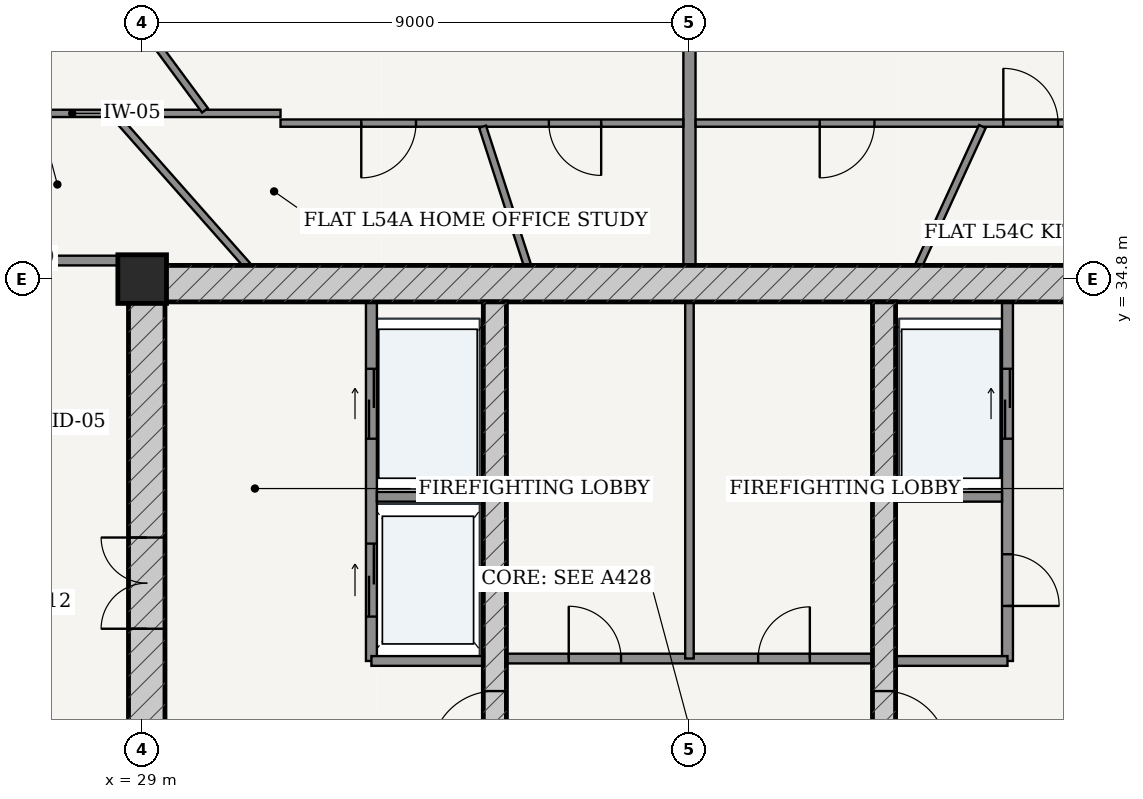
"""IFC4 building model, lengths in metres.
Left out: names, types, materials, properties, quantities, classifications, styles, units other than length and angle.
Written with IfcOpenShell. Run it as: python <this file> out.ifc"""

import sys

from ifc_helpers import new_model, si_unit, direction, frame, frame_2d, origin, origin_2d, place, context, subcontext, project, spatial, rectangle, extrude, source, transform, mapped, element, fill, save


model = new_model("IFC4")
c1 = context("Model", 3, precision=1e-05, world=origin(), true_north=direction((-0.2419218956, 0.970295726276)))
c2 = subcontext(c1, "Body", "Model", "MODEL_VIEW")
j1 = project(units=[si_unit("LENGTHUNIT", "METRE"), si_unit("PLANEANGLEUNIT", "RADIAN")], contexts=[c1])
p1 = place(None, origin())
s1 = spatial("IfcSite", under=j1, at=p1, CompositionType="ELEMENT")
p2 = place(p1, origin())
s2 = spatial("IfcBuilding", under=s1, at=p2, CompositionType="ELEMENT")
p3 = place(p2, frame((0.0, 0.0, 206.0)))
s3 = spatial("IfcBuildingStorey", under=s2, at=p3, CompositionType="ELEMENT", Elevation=206.0)
p4 = place(p3, frame((29.0, 34.8, 0.0), z_axis=(0.0, 0.0, 1.0), x_axis=(1.0, 0.0, 0.0)))
e1 = element("IfcColumn", 1, at=p4, inside=s3, PredefinedType="COLUMN", context=c2, shape_type="SweptSolid", body=[
    extrude(rectangle(XDim=0.8, YDim=0.8, at=origin_2d()), origin(), (0.0, 0.0, 1.0), 3.7),
])
p5 = place(p3, frame((28.775, 34.725, 0.0), z_axis=(0.0, 0.0, 1.0), x_axis=(1.0, 0.0, 0.0)))
e2 = element("IfcWall", 2, at=p5, inside=s3, PredefinedType="SHEAR", context=c2, shape_type="SweptSolid", body=[
    extrude(rectangle(XDim=18.45, YDim=0.6, at=frame_2d((9.225, 0.0))), origin(), (0.0, 0.0, 1.0), 3.435),
])
p6 = place(p3, frame((29.075, 19.175, 0.0), z_axis=(0.0, 0.0, 1.0), x_axis=(0.0, 1.0, 0.0)))
e3 = element("IfcWall", 3, at=p6, inside=s3, PredefinedType="SHEAR", context=c2, shape_type="SweptSolid", body=[
    extrude(rectangle(XDim=15.25, YDim=0.6, at=frame_2d((7.625, 0.0))), origin(), (0.0, 0.0, 1.0), 3.435),
])
p7 = place(p6, frame((9.875, 0.0, 0.0)))
e4 = element("IfcOpeningElement", 4, at=p7, cuts=e3, PredefinedType="OPENING", context=c2, shape_type="SweptSolid", body=[
    extrude(rectangle(XDim=1.5, YDim=2.2, at=frame_2d((0.75, 1.1))), frame((0.0, 0.31, 0.0), z_axis=(0.0, -1.0, 0.0), x_axis=(1.0, 0.0, 0.0)), (0.0, 0.0, 1.0), 0.62),
])
p8 = place(p3, frame((34.8, 19.175, 0.0), z_axis=(0.0, 0.0, 1.0), x_axis=(0.0, 1.0, 0.0)))
e5 = element("IfcWall", 5, at=p8, inside=s3, PredefinedType="SHEAR", context=c2, shape_type="SweptSolid", body=[
    extrude(rectangle(XDim=15.25, YDim=0.38, at=frame_2d((7.625, 0.0))), origin(), (0.0, 0.0, 1.0), 3.435),
])
p9 = place(p8, frame((7.8, 0.0, 0.0)))
e6 = element("IfcOpeningElement", 6, at=p9, cuts=e5, PredefinedType="OPENING", context=c2, shape_type="SweptSolid", body=[
    extrude(rectangle(XDim=1.05, YDim=2.15, at=frame_2d((0.525, 1.075))), frame((0.0, 0.2, 0.0), z_axis=(0.0, -1.0, 0.0), x_axis=(1.0, 0.0, 0.0)), (0.0, 0.0, 1.0), 0.4),
])
p10 = place(p3, frame((41.2, 19.175, 0.0), z_axis=(0.0, 0.0, 1.0), x_axis=(0.0, 1.0, 0.0)))
e7 = element("IfcWall", 7, at=p10, inside=s3, PredefinedType="SHEAR", context=c2, shape_type="SweptSolid", body=[
    extrude(rectangle(XDim=15.25, YDim=0.38, at=frame_2d((7.625, 0.0))), origin(), (0.0, 0.0, 1.0), 3.435),
])
p11 = place(p10, frame((7.8, 0.0, 0.0)))
e8 = element("IfcOpeningElement", 8, at=p11, cuts=e7, PredefinedType="OPENING", context=c2, shape_type="SweptSolid", body=[
    extrude(rectangle(XDim=1.05, YDim=2.15, at=frame_2d((0.525, 1.075))), frame((0.0, 0.2, 0.0), z_axis=(0.0, -1.0, 0.0), x_axis=(1.0, 0.0, 0.0)), (0.0, 0.0, 1.0), 0.4),
])
p12 = place(p3, frame((32.77, 28.52, 0.0), z_axis=(0.0, 0.0, 1.0), x_axis=(0.0, 1.0, 0.0)))
e9 = element("IfcWall", 9, at=p12, inside=s3, PredefinedType="PARTITIONING", context=c2, shape_type="SweptSolid", body=[
    extrude(rectangle(XDim=5.905, YDim=0.18, at=frame_2d((2.953, 0.0))), origin(), (0.0, 0.0, 1.0), 3.435),
])
p13 = place(p12, frame((3.655, 0.0, 0.0)))
e10 = element("IfcOpeningElement", 10, at=p13, cuts=e9, PredefinedType="OPENING", context=c2, shape_type="SweptSolid", body=[
    extrude(rectangle(XDim=1.15, YDim=2.2, at=frame_2d((0.575, 1.1))), frame((0.0, 0.1, 0.0), z_axis=(0.0, -1.0, 0.0), x_axis=(1.0, 0.0, 0.0)), (0.0, 0.0, 1.0), 0.2),
])
p14 = place(p12, frame((0.73, 0.0, 0.0)))
e11 = element("IfcOpeningElement", 11, at=p14, cuts=e9, PredefinedType="OPENING", context=c2, shape_type="SweptSolid", body=[
    extrude(rectangle(XDim=1.2, YDim=2.25, at=frame_2d((0.6, 1.125))), frame((0.0, 0.1, 0.0), z_axis=(0.0, -1.0, 0.0), x_axis=(1.0, 0.0, 0.0)), (0.0, 0.0, 1.0), 0.2),
])
p15 = place(p3, frame((32.86, 31.22, 0.0), z_axis=(0.0, 0.0, 1.0), x_axis=(1.0, 0.0, 0.0)))
e12 = element("IfcWall", 12, at=p15, inside=s3, PredefinedType="PARTITIONING", context=c2, shape_type="SweptSolid", body=[
    extrude(rectangle(XDim=1.75, YDim=0.16, at=frame_2d((0.875, 0.0))), origin(), (0.0, 0.0, 1.0), 3.435),
])
p16 = place(p3, frame((32.77, 28.52, 0.0), z_axis=(0.0, 0.0, 1.0), x_axis=(1.0, 0.0, 0.0)))
e13 = element("IfcWall", 13, at=p16, inside=s3, PredefinedType="PARTITIONING", context=c2, shape_type="SweptSolid", body=[
    extrude(rectangle(XDim=1.84, YDim=0.16, at=frame_2d((0.92, 0.0))), origin(), (0.0, 0.0, 1.0), 3.435),
])
p17 = place(p3, frame((43.23, 28.52, 0.0), z_axis=(0.0, 0.0, 1.0), x_axis=(0.0, 1.0, 0.0)))
e14 = element("IfcWall", 14, at=p17, inside=s3, PredefinedType="PARTITIONING", context=c2, shape_type="SweptSolid", body=[
    extrude(rectangle(XDim=5.905, YDim=0.18, at=frame_2d((2.953, 0.0))), origin(), (0.0, 0.0, 1.0), 3.435),
])
p18 = place(p17, frame((0.905, 0.0, 0.0)))
e15 = element("IfcOpeningElement", 15, at=p18, cuts=e14, PredefinedType="OPENING", context=c2, shape_type="SweptSolid", body=[
    extrude(rectangle(XDim=0.85, YDim=2.1, at=frame_2d((0.425, 1.05))), frame((0.0, 0.1, 0.0), z_axis=(0.0, -1.0, 0.0), x_axis=(1.0, 0.0, 0.0)), (0.0, 0.0, 1.0), 0.2),
])
p19 = place(p17, frame((3.655, 0.0, 0.0)))
e16 = element("IfcOpeningElement", 16, at=p19, cuts=e14, PredefinedType="OPENING", context=c2, shape_type="SweptSolid", body=[
    extrude(rectangle(XDim=1.15, YDim=2.2, at=frame_2d((0.575, 1.1))), frame((0.0, 0.1, 0.0), z_axis=(0.0, -1.0, 0.0), x_axis=(1.0, 0.0, 0.0)), (0.0, 0.0, 1.0), 0.2),
])
p20 = place(p3, frame((41.39, 31.22, 0.0), z_axis=(0.0, 0.0, 1.0), x_axis=(1.0, 0.0, 0.0)))
e17 = element("IfcWall", 17, at=p20, inside=s3, PredefinedType="PARTITIONING", context=c2, shape_type="SweptSolid", body=[
    extrude(rectangle(XDim=1.75, YDim=0.16, at=frame_2d((0.875, 0.0))), origin(), (0.0, 0.0, 1.0), 3.435),
])
p21 = place(p3, frame((41.39, 28.52, 0.0), z_axis=(0.0, 0.0, 1.0), x_axis=(1.0, 0.0, 0.0)))
e18 = element("IfcWall", 18, at=p21, inside=s3, PredefinedType="PARTITIONING", context=c2, shape_type="SweptSolid", body=[
    extrude(rectangle(XDim=1.84, YDim=0.16, at=frame_2d((0.92, 0.0))), origin(), (0.0, 0.0, 1.0), 3.435),
])
p22 = place(p3, frame((34.99, 28.56, 0.0), z_axis=(0.0, 0.0, 1.0), x_axis=(1.0, 0.0, 0.0)))
e19 = element("IfcWall", 19, at=p22, inside=s3, PredefinedType="PARTITIONING", context=c2, shape_type="SweptSolid", body=[
    extrude(rectangle(XDim=6.02, YDim=0.16, at=frame_2d((3.01, 0.0))), origin(), (0.0, 0.0, 1.0), 3.435),
])
p23 = place(p22, frame((1.025, 0.0, 0.0)))
e20 = element("IfcOpeningElement", 20, at=p23, cuts=e19, PredefinedType="OPENING", context=c2, shape_type="SweptSolid", body=[
    extrude(rectangle(XDim=0.86, YDim=2.1, at=frame_2d((0.43, 1.05))), frame((0.0, 0.09, 0.0), z_axis=(0.0, -1.0, 0.0), x_axis=(1.0, 0.0, 0.0)), (0.0, 0.0, 1.0), 0.18),
])
p24 = place(p22, frame((4.14, 0.0, 0.0)))
e21 = element("IfcOpeningElement", 21, at=p24, cuts=e19, PredefinedType="OPENING", context=c2, shape_type="SweptSolid", body=[
    extrude(rectangle(XDim=0.85, YDim=2.1, at=frame_2d((0.425, 1.05))), frame((0.0, 0.09, 0.0), z_axis=(0.0, -1.0, 0.0), x_axis=(1.0, 0.0, 0.0)), (0.0, 0.0, 1.0), 0.18),
])
p25 = place(p3, frame((38.0, 28.56, 0.0), z_axis=(0.0, 0.0, 1.0), x_axis=(0.0, 1.0, 0.0)))
e22 = element("IfcWall", 22, at=p25, inside=s3, PredefinedType="PARTITIONING", context=c2, shape_type="SweptSolid", body=[
    extrude(rectangle(XDim=5.865, YDim=0.14, at=frame_2d((2.933, 0.0))), origin(), (0.0, 0.0, 1.0), 3.435),
])
p26 = place(p3, frame((26.845, 35.105, 0.0), z_axis=(0.0, 0.0, 1.0), x_axis=(1.0, 0.0, 0.0)))
e23 = element("IfcWall", 23, at=p26, inside=s3, PredefinedType="PARTITIONING", context=c2, shape_type="SweptSolid", body=[
    extrude(rectangle(XDim=1.93, YDim=0.16, at=frame_2d((0.965, 0.0))), origin(), (0.0, 0.0, 1.0), 3.435),
])
p27 = place(p3, frame((38.0, 35.027, 0.0), z_axis=(0.0, 0.0, 1.0), x_axis=(0.0, 1.0, 0.0)))
e24 = element("IfcWall", 24, at=p27, inside=s3, PredefinedType="PARTITIONING", context=c2, shape_type="SweptSolid", body=[
    extrude(rectangle(XDim=11.413, YDim=0.2, at=frame_2d((5.707, 0.0))), origin(), (0.0, 0.0, 1.0), 2.52),
])
p28 = place(p3, frame((24.425, 37.525, 0.0), z_axis=(0.0, 0.0, 1.0), x_axis=(1.0, 0.0, 0.0)))
e25 = element("IfcWall", 25, at=p28, inside=s3, PredefinedType="PARTITIONING", context=c2, shape_type="SweptSolid", body=[
    extrude(rectangle(XDim=6.85, YDim=0.12, at=frame_2d((3.425, 0.0))), origin(), (0.0, 0.0, 1.0), 2.951),
])
p29 = place(p3, frame((31.275, 37.365, 0.0), z_axis=(0.0, 0.0, 1.0), x_axis=(1.0, 0.0, 0.0)))
e26 = element("IfcWall", 26, at=p29, inside=s3, PredefinedType="PARTITIONING", context=c2, shape_type="SweptSolid", body=[
    extrude(rectangle(XDim=6.623, YDim=0.12, at=frame_2d((3.312, 0.0))), origin(), (0.0, 0.0, 1.0), 2.951),
])
p30 = place(p29, frame((4.413, 0.0, 0.0)))
e27 = element("IfcOpeningElement", 27, at=p30, cuts=e26, PredefinedType="OPENING", context=c2, shape_type="SweptSolid", body=[
    extrude(rectangle(XDim=0.86, YDim=2.15, at=frame_2d((0.43, 1.075))), frame((0.0, 0.07, 0.0), z_axis=(0.0, -1.0, 0.0), x_axis=(1.0, 0.0, 0.0)), (0.0, 0.0, 1.0), 0.14),
])
p31 = place(p29, frame((1.328, 0.0, 0.0)))
e28 = element("IfcOpeningElement", 28, at=p31, cuts=e26, PredefinedType="OPENING", context=c2, shape_type="SweptSolid", body=[
    extrude(rectangle(XDim=0.9, YDim=2.15, at=frame_2d((0.45, 1.075))), frame((0.0, 0.07, 0.0), z_axis=(0.0, -1.0, 0.0), x_axis=(1.0, 0.0, 0.0)), (0.0, 0.0, 1.0), 0.14),
])
p32 = place(p3, frame((30.033, 37.575, 0.0), z_axis=(0.0, 0.0, 1.0), x_axis=(-0.59452500855, 0.804077119565, 0.0)))
e29 = element("IfcWall", 29, at=p32, inside=s3, PredefinedType="PARTITIONING", context=c2, shape_type="SweptSolid", body=[
    extrude(rectangle(XDim=6.867, YDim=0.12, at=frame_2d((3.434, 0.0))), origin(), (0.0, 0.0, 1.0), 2.951),
])
p33 = place(p32, frame((1.976, 0.0, 0.0)))
e30 = element("IfcOpeningElement", 30, at=p33, cuts=e29, PredefinedType="OPENING", context=c2, shape_type="SweptSolid", body=[
    extrude(rectangle(XDim=0.9, YDim=2.15, at=frame_2d((0.45, 1.075))), frame((0.0, 0.07, 0.0), z_axis=(0.0, -1.0, 0.0), x_axis=(1.0, 0.0, 0.0)), (0.0, 0.0, 1.0), 0.14),
])
p34 = place(p3, frame((35.336, 35.027, 0.0), z_axis=(0.0, 0.0, 1.0), x_axis=(-0.308083476138, 0.951359328398, 0.0)))
e31 = element("IfcWall", 31, at=p34, inside=s3, PredefinedType="PARTITIONING", context=c2, shape_type="SweptSolid", body=[
    extrude(rectangle(XDim=2.396, YDim=0.12, at=frame_2d((1.198, 0.0))), origin(), (0.0, 0.0, 1.0), 2.52),
])
p35 = place(p3, frame((30.726, 35.027, 0.0), z_axis=(0.0, 0.0, 1.0), x_axis=(-0.662398427862, 0.749151735475, 0.0)))
e32 = element("IfcWall", 32, at=p35, inside=s3, PredefinedType="PARTITIONING", context=c2, shape_type="SweptSolid", body=[
    extrude(rectangle(XDim=3.273, YDim=0.12, at=frame_2d((1.636, 0.0))), origin(), (0.0, 0.0, 1.0), 3.435),
])
p36 = place(p3, frame((38.102, 37.365, 0.0), z_axis=(0.0, 0.0, 1.0), x_axis=(1.0, 0.0, 0.0)))
e33 = element("IfcWall", 33, at=p36, inside=s3, PredefinedType="PARTITIONING", context=c2, shape_type="SweptSolid", body=[
    extrude(rectangle(XDim=6.623, YDim=0.12, at=frame_2d((3.312, 0.0))), origin(), (0.0, 0.0, 1.0), 2.951),
])
p37 = place(p36, frame((5.06, 0.0, 0.0)))
e34 = element("IfcOpeningElement", 34, at=p37, cuts=e33, PredefinedType="OPENING", context=c2, shape_type="SweptSolid", body=[
    extrude(rectangle(XDim=0.9, YDim=2.15, at=frame_2d((0.45, 1.075))), frame((0.0, 0.07, 0.0), z_axis=(0.0, -1.0, 0.0), x_axis=(1.0, 0.0, 0.0)), (0.0, 0.0, 1.0), 0.14),
])
p38 = place(p36, frame((2.04, 0.0, 0.0)))
e35 = element("IfcOpeningElement", 35, at=p38, cuts=e33, PredefinedType="OPENING", context=c2, shape_type="SweptSolid", body=[
    extrude(rectangle(XDim=0.9, YDim=2.15, at=frame_2d((0.45, 1.075))), frame((0.0, 0.07, 0.0), z_axis=(0.0, -1.0, 0.0), x_axis=(1.0, 0.0, 0.0)), (0.0, 0.0, 1.0), 0.14),
])
p39 = place(p3, frame((41.771, 35.027, 0.0), z_axis=(0.0, 0.0, 1.0), x_axis=(0.416688202143, 0.909049471808, 0.0)))
e36 = element("IfcWall", 36, at=p39, inside=s3, PredefinedType="PARTITIONING", context=c2, shape_type="SweptSolid", body=[
    extrude(rectangle(XDim=2.51, YDim=0.12, at=frame_2d((1.255, 0.0))), origin(), (0.0, 0.0, 1.0), 3.435),
])
m1 = source(origin(), c2, "Body", "SweptSolid", [
    extrude(rectangle(XDim=1.5, YDim=2.2, at=frame_2d((0.75, 1.1))), frame((0.0, 0.025, 0.0), z_axis=(0.0, -1.0, 0.0), x_axis=(1.0, 0.0, 0.0)), (0.0, 0.0, 1.0), 0.05),
])
p40 = place(p7, origin())
e37 = element("IfcDoor", 37, at=p40, inside=s3, OperationType="DOUBLE_DOOR_SINGLE_SWING", PredefinedType="DOOR", context=c2, shape_type="MappedRepresentation", body=[
    mapped(m1, transform((0.0, 0.0, 0.0), scale=1.0)),
])
fill(e4, e37)
m2 = source(origin(), c2, "Body", "SweptSolid", [
    extrude(rectangle(XDim=1.05, YDim=2.15, at=frame_2d((0.525, 1.075))), frame((0.0, 0.025, 0.0), z_axis=(0.0, -1.0, 0.0), x_axis=(1.0, 0.0, 0.0)), (0.0, 0.0, 1.0), 0.05),
])
p41 = place(p9, origin())
e38 = element("IfcDoor", 38, at=p41, inside=s3, OperationType="SINGLE_SWING_LEFT", PredefinedType="DOOR", context=c2, shape_type="MappedRepresentation", body=[
    mapped(m2, transform((0.0, 0.0, 0.0), scale=1.0)),
])
fill(e6, e38)
p42 = place(p11, frame((1.05, 0.0, 0.0), z_axis=(0.0, 0.0, 1.0), x_axis=(-1.0, 0.0, 0.0)))
e39 = element("IfcDoor", 39, at=p42, inside=s3, OperationType="SINGLE_SWING_RIGHT", PredefinedType="DOOR", context=c2, shape_type="MappedRepresentation", body=[
    mapped(m2, transform((0.0, 0.0, 0.0), scale=1.0)),
])
fill(e8, e39)
m3 = source(origin(), c2, "Body", "SweptSolid", [
    extrude(rectangle(XDim=0.85, YDim=2.1, at=frame_2d((0.425, 1.05))), frame((0.0, 0.025, 0.0), z_axis=(0.0, -1.0, 0.0), x_axis=(1.0, 0.0, 0.0)), (0.0, 0.0, 1.0), 0.05),
])
p43 = place(p18, frame((0.85, 0.0, 0.0), z_axis=(0.0, 0.0, 1.0), x_axis=(-1.0, 0.0, 0.0)))
e40 = element("IfcDoor", 40, at=p43, inside=s3, OperationType="SINGLE_SWING_RIGHT", PredefinedType="DOOR", context=c2, shape_type="MappedRepresentation", body=[
    mapped(m3, transform((0.0, 0.0, 0.0), scale=1.0)),
])
fill(e15, e40)
m4 = source(origin(), c2, "Body", "SweptSolid", [
    extrude(rectangle(XDim=0.86, YDim=2.1, at=frame_2d((0.43, 1.05))), frame((0.0, 0.025, 0.0), z_axis=(0.0, -1.0, 0.0), x_axis=(1.0, 0.0, 0.0)), (0.0, 0.0, 1.0), 0.05),
])
p44 = place(p23, origin())
e41 = element("IfcDoor", 41, at=p44, inside=s3, OperationType="SINGLE_SWING_LEFT", PredefinedType="DOOR", context=c2, shape_type="MappedRepresentation", body=[
    mapped(m4, transform((0.0, 0.0, 0.0), scale=1.0)),
])
fill(e20, e41)
p45 = place(p24, origin())
e42 = element("IfcDoor", 42, at=p45, inside=s3, OperationType="SINGLE_SWING_RIGHT", PredefinedType="DOOR", context=c2, shape_type="MappedRepresentation", body=[
    mapped(m3, transform((0.0, 0.0, 0.0), scale=1.0)),
])
fill(e21, e42)
m5 = source(origin(), c2, "Body", "SweptSolid", [
    extrude(rectangle(XDim=1.15, YDim=2.2, at=frame_2d((0.575, 1.1))), frame((0.0, 0.025, 0.0), z_axis=(0.0, -1.0, 0.0), x_axis=(1.0, 0.0, 0.0)), (0.0, 0.0, 1.0), 0.05),
])
p46 = place(p13, origin())
e43 = element("IfcDoor", 43, at=p46, inside=s3, OperationType="DOUBLE_DOOR_SLIDING", PredefinedType="DOOR", context=c2, shape_type="MappedRepresentation", body=[
    mapped(m5, transform((0.0, 0.0, 0.0), scale=1.0)),
])
fill(e10, e43)
p47 = place(p19, origin())
e44 = element("IfcDoor", 44, at=p47, inside=s3, OperationType="DOUBLE_DOOR_SLIDING", PredefinedType="DOOR", context=c2, shape_type="MappedRepresentation", body=[
    mapped(m5, transform((0.0, 0.0, 0.0), scale=1.0)),
])
fill(e16, e44)
m6 = source(origin(), c2, "Body", "SweptSolid", [
    extrude(rectangle(XDim=1.2, YDim=2.25, at=frame_2d((0.6, 1.125))), frame((0.0, 0.025, 0.0), z_axis=(0.0, -1.0, 0.0), x_axis=(1.0, 0.0, 0.0)), (0.0, 0.0, 1.0), 0.05),
])
p48 = place(p14, origin())
e45 = element("IfcDoor", 45, at=p48, inside=s3, OperationType="DOUBLE_DOOR_SLIDING", PredefinedType="DOOR", context=c2, shape_type="MappedRepresentation", body=[
    mapped(m6, transform((0.0, 0.0, 0.0), scale=1.0)),
])
fill(e11, e45)
m7 = source(origin(), c2, "Body", "SweptSolid", [
    extrude(rectangle(XDim=0.86, YDim=2.15, at=frame_2d((0.43, 1.075))), frame((0.0, 0.025, 0.0), z_axis=(0.0, -1.0, 0.0), x_axis=(1.0, 0.0, 0.0)), (0.0, 0.0, 1.0), 0.05),
])
p49 = place(p30, frame((0.86, 0.0, 0.0), z_axis=(0.0, 0.0, 1.0), x_axis=(-1.0, 0.0, 0.0)))
e46 = element("IfcDoor", 46, at=p49, inside=s3, OperationType="SINGLE_SWING_LEFT", PredefinedType="DOOR", context=c2, shape_type="MappedRepresentation", body=[
    mapped(m7, transform((0.0, 0.0, 0.0), scale=1.0)),
])
fill(e27, e46)
m8 = source(origin(), c2, "Body", "SweptSolid", [
    extrude(rectangle(XDim=0.9, YDim=2.15, at=frame_2d((0.45, 1.075))), frame((0.0, 0.025, 0.0), z_axis=(0.0, -1.0, 0.0), x_axis=(1.0, 0.0, 0.0)), (0.0, 0.0, 1.0), 0.05),
])
p50 = place(p31, frame((0.9, 0.0, 0.0), z_axis=(0.0, 0.0, 1.0), x_axis=(-1.0, 0.0, 0.0)))
e47 = element("IfcDoor", 47, at=p50, inside=s3, OperationType="SINGLE_SWING_RIGHT", PredefinedType="DOOR", context=c2, shape_type="MappedRepresentation", body=[
    mapped(m8, transform((0.0, 0.0, 0.0), scale=1.0)),
])
fill(e28, e47)
p51 = place(p37, origin())
e48 = element("IfcDoor", 48, at=p51, inside=s3, OperationType="SINGLE_SWING_LEFT", PredefinedType="DOOR", context=c2, shape_type="MappedRepresentation", body=[
    mapped(m8, transform((0.0, 0.0, 0.0), scale=1.0)),
])
fill(e34, e48)
p52 = place(p38, frame((0.9, 0.0, 0.0), z_axis=(0.0, 0.0, 1.0), x_axis=(-1.0, 0.0, 0.0)))
e49 = element("IfcDoor", 49, at=p52, inside=s3, OperationType="SINGLE_SWING_RIGHT", PredefinedType="DOOR", context=c2, shape_type="MappedRepresentation", body=[
    mapped(m8, transform((0.0, 0.0, 0.0), scale=1.0)),
])
fill(e35, e49)
save(model, sys.argv[1])
